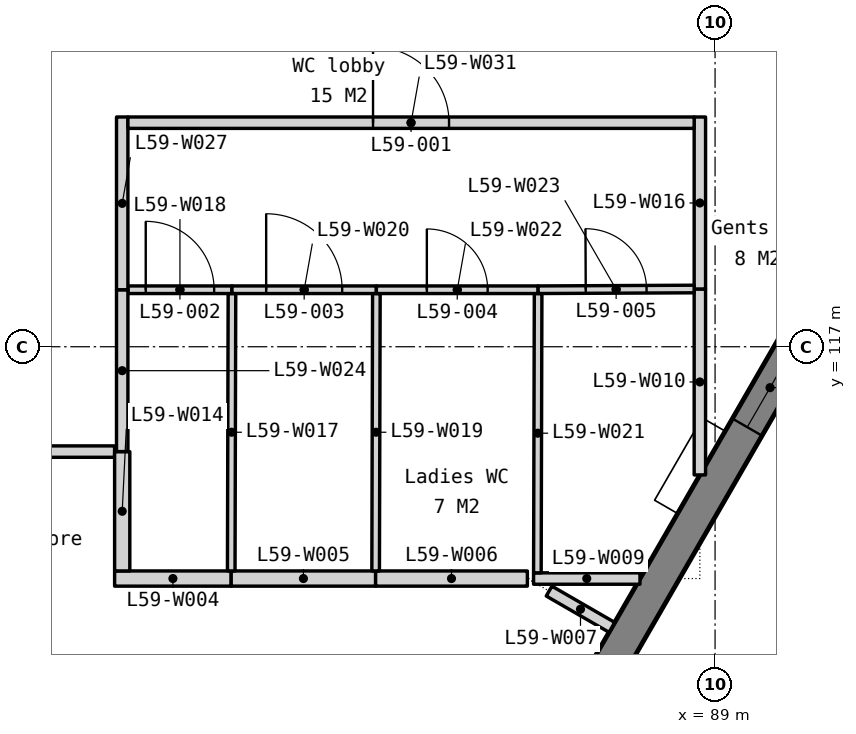
"""IFC4 building model, lengths in metres.
Left out: names, types, materials, properties, quantities, classifications, styles, units other than length and angle.
Written with IfcOpenShell. Run it as: python <this file> out.ifc"""

import sys

from ifc_helpers import new_model, si_unit, direction, frame, frame_2d, origin, place, context, subcontext, project, spatial, polyline, rectangle, outline, extrude, element, fill, save


model = new_model("IFC4")
c1 = context("Model", 3, precision=1e-05, world=origin(), true_north=direction((0.0, 1.0)))
c2 = subcontext(c1, "Body", "Model", "MODEL_VIEW")
j1 = project(units=[si_unit("LENGTHUNIT", "METRE"), si_unit("PLANEANGLEUNIT", "RADIAN")], contexts=[c1])
p1 = place(None, origin())
s1 = spatial("IfcSite", under=j1, at=p1, CompositionType="ELEMENT")
p2 = place(p1, origin())
s2 = spatial("IfcBuilding", under=s1, at=p2, CompositionType="ELEMENT")
p3 = place(p2, frame((0.0, 0.0, 242.6)))
s3 = spatial("IfcBuildingStorey", under=s2, at=p3, CompositionType="ELEMENT", Elevation=242.6)
p4 = place(p3, frame((80.905, 101.188, -0.15), z_axis=(0.0, 0.0, 1.0), x_axis=(0.500002536638, 0.866023939251, 0.0)))
e1 = element("IfcWall", 1, at=p4, inside=s3, PredefinedType="SOLIDWALL", context=c2, shape_type="SweptSolid", body=[
    extrude(outline(polyline([(36.972, 0.0), (36.972, 3.9), (0.0, 3.9), (0.0, 0.0), (36.972, 0.0)])), frame((0.0, 0.225, 0.0), z_axis=(0.0, -1.0, 0.0), x_axis=(1.0, 0.0, 0.0)), (0.0, 0.0, 1.0), 0.45),
])
p5 = place(p4, frame((0.715, 0.0, 0.95)))
e2 = element("IfcOpeningElement", 2, at=p5, cuts=e1, PredefinedType="OPENING", context=c2, shape_type="SweptSolid", body=[
    extrude(rectangle(XDim=1.2, YDim=2.2, at=frame_2d((0.6, 1.1))), frame((0.0, 0.235, 0.0), z_axis=(0.0, -1.0, 0.0), x_axis=(1.0, 0.0, 0.0)), (0.0, 0.0, 1.0), 0.47),
])
p6 = place(p4, frame((7.793, 0.0, 0.95)))
e3 = element("IfcOpeningElement", 3, at=p6, cuts=e1, PredefinedType="OPENING", context=c2, shape_type="SweptSolid", body=[
    extrude(rectangle(XDim=1.2, YDim=2.2, at=frame_2d((0.6, 1.1))), frame((0.0, 0.235, 0.0), z_axis=(0.0, -1.0, 0.0), x_axis=(1.0, 0.0, 0.0)), (0.0, 0.0, 1.0), 0.47),
])
p7 = place(p4, frame((9.493, 0.0, 0.95)))
e4 = element("IfcOpeningElement", 4, at=p7, cuts=e1, PredefinedType="OPENING", context=c2, shape_type="SweptSolid", body=[
    extrude(rectangle(XDim=1.2, YDim=2.2, at=frame_2d((0.6, 1.1))), frame((0.0, 0.235, 0.0), z_axis=(0.0, -1.0, 0.0), x_axis=(1.0, 0.0, 0.0)), (0.0, 0.0, 1.0), 0.47),
])
p8 = place(p4, frame((17.036, 0.0, 0.95)))
e5 = element("IfcOpeningElement", 5, at=p8, cuts=e1, PredefinedType="OPENING", context=c2, shape_type="SweptSolid", body=[
    extrude(rectangle(XDim=1.2, YDim=2.2, at=frame_2d((0.6, 1.1))), frame((0.0, 0.235, 0.0), z_axis=(0.0, -1.0, 0.0), x_axis=(1.0, 0.0, 0.0)), (0.0, 0.0, 1.0), 0.47),
])
p9 = place(p4, frame((18.736, 0.0, 0.95)))
e6 = element("IfcOpeningElement", 6, at=p9, cuts=e1, PredefinedType="OPENING", context=c2, shape_type="SweptSolid", body=[
    extrude(rectangle(XDim=1.2, YDim=2.2, at=frame_2d((0.6, 1.1))), frame((0.0, 0.235, 0.0), z_axis=(0.0, -1.0, 0.0), x_axis=(1.0, 0.0, 0.0)), (0.0, 0.0, 1.0), 0.47),
])
p10 = place(p4, frame((26.279, 0.0, 0.95)))
e7 = element("IfcOpeningElement", 7, at=p10, cuts=e1, PredefinedType="OPENING", context=c2, shape_type="SweptSolid", body=[
    extrude(rectangle(XDim=1.2, YDim=2.2, at=frame_2d((0.6, 1.1))), frame((0.0, 0.235, 0.0), z_axis=(0.0, -1.0, 0.0), x_axis=(1.0, 0.0, 0.0)), (0.0, 0.0, 1.0), 0.47),
])
p11 = place(p4, frame((27.979, 0.0, 0.95)))
e8 = element("IfcOpeningElement", 8, at=p11, cuts=e1, PredefinedType="OPENING", context=c2, shape_type="SweptSolid", body=[
    extrude(rectangle(XDim=1.2, YDim=2.2, at=frame_2d((0.6, 1.1))), frame((0.0, 0.235, 0.0), z_axis=(0.0, -1.0, 0.0), x_axis=(1.0, 0.0, 0.0)), (0.0, 0.0, 1.0), 0.47),
])
p12 = place(p4, frame((35.058, 0.0, 0.95)))
e9 = element("IfcOpeningElement", 9, at=p12, cuts=e1, PredefinedType="OPENING", context=c2, shape_type="SweptSolid", body=[
    extrude(rectangle(XDim=1.2, YDim=2.2, at=frame_2d((0.6, 1.1))), frame((0.0, 0.235, 0.0), z_axis=(0.0, -1.0, 0.0), x_axis=(1.0, 0.0, 0.0)), (0.0, 0.0, 1.0), 0.47),
])
p13 = place(p3, frame((81.1, 113.95, 0.0), z_axis=(0.0, 0.0, 1.0), x_axis=(1.0, 0.0, 0.0)))
e10 = element("IfcWall", 10, at=p13, inside=s3, PredefinedType="PARTITIONING", context=c2, shape_type="SweptSolid", body=[
    extrude(rectangle(XDim=1.534, YDim=0.2, at=frame_2d((0.767, 0.0))), origin(), (0.0, 0.0, 1.0), 3.75),
])
p14 = place(p3, frame((82.634, 113.95, 0.0), z_axis=(0.0, 0.0, 1.0), x_axis=(1.0, 0.0, 0.0)))
e11 = element("IfcWall", 11, at=p14, inside=s3, PredefinedType="PARTITIONING", context=c2, shape_type="SweptSolid", body=[
    extrude(rectangle(XDim=1.9, YDim=0.2, at=frame_2d((0.95, 0.0))), origin(), (0.0, 0.0, 1.0), 3.75),
])
p15 = place(p3, frame((84.534, 113.95, 0.0), z_axis=(0.0, 0.0, 1.0), x_axis=(1.0, 0.0, 0.0)))
e12 = element("IfcWall", 12, at=p15, inside=s3, PredefinedType="PARTITIONING", context=c2, shape_type="SweptSolid", body=[
    extrude(rectangle(XDim=1.997, YDim=0.2, at=frame_2d((0.998, 0.0))), origin(), (0.0, 0.0, 1.0), 3.75),
])
p16 = place(p3, frame((86.816, 113.785, 0.0), z_axis=(0.0, 0.0, 1.0), x_axis=(0.865951249342, -0.500128417272, 0.0)))
e13 = element("IfcWall", 13, at=p16, inside=s3, PredefinedType="PARTITIONING", context=c2, shape_type="SweptSolid", body=[
    extrude(rectangle(XDim=0.954, YDim=0.15, at=frame_2d((0.477, 0.0))), origin(), (0.0, 0.0, 1.0), 3.75),
])
p17 = place(p3, frame((86.612, 113.95, 0.0), z_axis=(0.0, 0.0, 1.0), x_axis=(1.0, 0.0, 0.0)))
e14 = element("IfcWall", 14, at=p17, inside=s3, PredefinedType="PARTITIONING", context=c2, shape_type="SweptSolid", body=[
    extrude(rectangle(XDim=1.4, YDim=0.15, at=frame_2d((0.7, 0.0))), origin(), (0.0, 0.0, 1.0), 3.75),
])
p18 = place(p3, frame((88.8, 115.313, 0.0), z_axis=(0.0, 0.0, 1.0), x_axis=(0.0, 1.0, 0.0)))
e15 = element("IfcWall", 15, at=p18, inside=s3, PredefinedType="PARTITIONING", context=c2, shape_type="SweptSolid", body=[
    extrude(rectangle(XDim=2.447, YDim=0.15, at=frame_2d((1.223, 0.0))), origin(), (0.0, 0.0, 1.0), 3.062),
])
p19 = place(p3, frame((76.363, 115.62, 0.0), z_axis=(0.0, 0.0, 1.0), x_axis=(1.0, 0.0, 0.0)))
e16 = element("IfcWall", 16, at=p19, inside=s3, PredefinedType="PARTITIONING", context=c2, shape_type="SweptSolid", body=[
    extrude(rectangle(XDim=4.737, YDim=0.15, at=frame_2d((2.369, 0.0))), origin(), (0.0, 0.0, 1.0), 3.75),
])
p20 = place(p19, frame((1.469, 0.0, 0.0)))
e17 = element("IfcOpeningElement", 17, at=p20, cuts=e16, PredefinedType="OPENING", context=c2, shape_type="SweptSolid", body=[
    extrude(rectangle(XDim=1.8, YDim=2.1, at=frame_2d((0.9, 1.05))), frame((0.0, 0.085, 0.0), z_axis=(0.0, -1.0, 0.0), x_axis=(1.0, 0.0, 0.0)), (0.0, 0.0, 1.0), 0.17),
])
p21 = place(p3, frame((81.2, 114.05, 0.0), z_axis=(0.0, 0.0, 1.0), x_axis=(0.0, 1.0, 0.0)))
e18 = element("IfcWall", 18, at=p21, inside=s3, PredefinedType="PARTITIONING", context=c2, shape_type="SweptSolid", body=[
    extrude(rectangle(XDim=1.57, YDim=0.2, at=frame_2d((0.785, 0.0))), origin(), (0.0, 0.0, 1.0), 3.75),
])
p22 = place(p3, frame((88.8, 117.76, 0.0), z_axis=(0.0, 0.0, 1.0), x_axis=(0.0, 1.0, 0.0)))
e19 = element("IfcWall", 19, at=p22, inside=s3, PredefinedType="PARTITIONING", context=c2, shape_type="SweptSolid", body=[
    extrude(rectangle(XDim=2.263, YDim=0.15, at=frame_2d((1.131, 0.0))), origin(), (0.0, 0.0, 1.0), 3.062),
])
p23 = place(p3, frame((82.634, 114.05, 0.0), z_axis=(0.0, 0.0, 1.0), x_axis=(0.002608686776, 0.999996597371, 0.0)))
e20 = element("IfcWall", 20, at=p23, inside=s3, PredefinedType="PARTITIONING", context=c2, shape_type="SweptSolid", body=[
    extrude(rectangle(XDim=3.65, YDim=0.1, at=frame_2d((1.825, 0.0))), origin(), (0.0, 0.0, 1.0), 3.75),
])
p24 = place(p3, frame((81.275, 117.75, 0.0), z_axis=(0.0, 0.0, 1.0), x_axis=(1.0, 0.0, 0.0)))
e21 = element("IfcWall", 21, at=p24, inside=s3, PredefinedType="PARTITIONING", context=c2, shape_type="SweptSolid", body=[
    extrude(rectangle(XDim=1.369, YDim=0.1, at=frame_2d((0.685, 0.0))), origin(), (0.0, 0.0, 1.0), 3.75),
])
p25 = place(p24, frame((0.235, 0.0, 0.0)))
e22 = element("IfcOpeningElement", 22, at=p25, cuts=e21, PredefinedType="OPENING", context=c2, shape_type="SweptSolid", body=[
    extrude(rectangle(XDim=0.9, YDim=2.1, at=frame_2d((0.45, 1.05))), frame((0.0, 0.06, 0.0), z_axis=(0.0, -1.0, 0.0), x_axis=(1.0, 0.0, 0.0)), (0.0, 0.0, 1.0), 0.12),
])
p26 = place(p3, frame((84.534, 114.05, 0.0), z_axis=(0.0, 0.0, 1.0), x_axis=(0.002675575707, 0.999996420641, 0.0)))
e23 = element("IfcWall", 23, at=p26, inside=s3, PredefinedType="PARTITIONING", context=c2, shape_type="SweptSolid", body=[
    extrude(rectangle(XDim=3.65, YDim=0.1, at=frame_2d((1.825, 0.0))), origin(), (0.0, 0.0, 1.0), 3.75),
])
p27 = place(p3, frame((82.644, 117.75, 0.0), z_axis=(0.0, 0.0, 1.0), x_axis=(1.0, 0.0, 0.0)))
e24 = element("IfcWall", 24, at=p27, inside=s3, PredefinedType="PARTITIONING", context=c2, shape_type="SweptSolid", body=[
    extrude(rectangle(XDim=1.9, YDim=0.1, at=frame_2d((0.95, 0.0))), origin(), (0.0, 0.0, 1.0), 3.75),
])
p28 = place(p27, frame((0.45, 0.0, 0.0)))
e25 = element("IfcOpeningElement", 25, at=p28, cuts=e24, PredefinedType="OPENING", context=c2, shape_type="SweptSolid", body=[
    extrude(rectangle(XDim=1.0, YDim=2.1, at=frame_2d((0.5, 1.05))), frame((0.0, 0.06, 0.0), z_axis=(0.0, -1.0, 0.0), x_axis=(1.0, 0.0, 0.0)), (0.0, 0.0, 1.0), 0.12),
])
p29 = place(p3, frame((86.662, 114.025, 0.0), z_axis=(0.0, 0.0, 1.0), x_axis=(0.002657268237, 0.999996469457, 0.0)))
e26 = element("IfcWall", 26, at=p29, inside=s3, PredefinedType="PARTITIONING", context=c2, shape_type="SweptSolid", body=[
    extrude(rectangle(XDim=3.675, YDim=0.1, at=frame_2d((1.837, 0.0))), origin(), (0.0, 0.0, 1.0), 3.75),
])
p30 = place(p3, frame((84.544, 117.75, 0.0), z_axis=(0.0, 0.0, 1.0), x_axis=(1.0, 0.0, 0.0)))
e27 = element("IfcWall", 27, at=p30, inside=s3, PredefinedType="PARTITIONING", context=c2, shape_type="SweptSolid", body=[
    extrude(rectangle(XDim=2.128, YDim=0.1, at=frame_2d((1.064, 0.0))), origin(), (0.0, 0.0, 1.0), 3.75),
])
p31 = place(p30, frame((0.664, 0.0, 0.0)))
e28 = element("IfcOpeningElement", 28, at=p31, cuts=e27, PredefinedType="OPENING", context=c2, shape_type="SweptSolid", body=[
    extrude(rectangle(XDim=0.8, YDim=2.1, at=frame_2d((0.4, 1.05))), frame((0.0, 0.06, 0.0), z_axis=(0.0, -1.0, 0.0), x_axis=(1.0, 0.0, 0.0)), (0.0, 0.0, 1.0), 0.12),
])
p32 = place(p3, frame((86.672, 117.75, 0.0), z_axis=(0.0, 0.0, 1.0), x_axis=(0.99998868658, 0.004756754366, 0.0)))
e29 = element("IfcWall", 29, at=p32, inside=s3, PredefinedType="PARTITIONING", context=c2, shape_type="SweptSolid", body=[
    extrude(rectangle(XDim=2.053, YDim=0.1, at=frame_2d((1.026, 0.0))), origin(), (0.0, 0.0, 1.0), 3.75),
])
p33 = place(p32, frame((0.626, 0.0, 0.0)))
e30 = element("IfcOpeningElement", 30, at=p33, cuts=e29, PredefinedType="OPENING", context=c2, shape_type="SweptSolid", body=[
    extrude(rectangle(XDim=0.8, YDim=2.1, at=frame_2d((0.4, 1.05))), frame((0.0, 0.06, 0.0), z_axis=(0.0, -1.0, 0.0), x_axis=(1.0, 0.0, 0.0)), (0.0, 0.0, 1.0), 0.12),
])
p34 = place(p3, frame((81.2, 115.62, 0.0), z_axis=(0.0, 0.0, 1.0), x_axis=(0.0, 1.0, 0.0)))
e31 = element("IfcWall", 31, at=p34, inside=s3, PredefinedType="PARTITIONING", context=c2, shape_type="SweptSolid", body=[
    extrude(rectangle(XDim=2.13, YDim=0.15, at=frame_2d((1.065, 0.0))), origin(), (0.0, 0.0, 1.0), 3.75),
])
p35 = place(p3, frame((81.2, 117.75, 0.0), z_axis=(0.0, 0.0, 1.0), x_axis=(0.0, 1.0, 0.0)))
e32 = element("IfcWall", 32, at=p35, inside=s3, PredefinedType="PARTITIONING", context=c2, shape_type="SweptSolid", body=[
    extrude(rectangle(XDim=2.273, YDim=0.15, at=frame_2d((1.136, 0.0))), origin(), (0.0, 0.0, 1.0), 3.75),
])
p36 = place(p3, frame((81.275, 119.948, 0.0), z_axis=(0.0, 0.0, 1.0), x_axis=(1.0, 0.0, 0.0)))
e33 = element("IfcWall", 33, at=p36, inside=s3, PredefinedType="PARTITIONING", context=c2, shape_type="SweptSolid", body=[
    extrude(rectangle(XDim=7.45, YDim=0.15, at=frame_2d((3.725, 0.0))), origin(), (0.0, 0.0, 1.0), 3.75),
])
p37 = place(p36, frame((3.225, 0.0, 0.0)))
e34 = element("IfcOpeningElement", 34, at=p37, cuts=e33, PredefinedType="OPENING", context=c2, shape_type="SweptSolid", body=[
    extrude(rectangle(XDim=1.0, YDim=2.1, at=frame_2d((0.5, 1.05))), frame((0.0, 0.085, 0.0), z_axis=(0.0, -1.0, 0.0), x_axis=(1.0, 0.0, 0.0)), (0.0, 0.0, 1.0), 0.17),
])
p38 = place(p8, origin())
e35 = element("IfcWindow", 35, at=p38, inside=s3, PartitioningType="SINGLE_PANEL", PredefinedType="WINDOW", context=c2, shape_type="SweptSolid", body=[
    extrude(rectangle(XDim=1.2, YDim=2.2, at=frame_2d((0.6, 1.1))), frame((0.0, 0.03, 0.0), z_axis=(0.0, -1.0, 0.0), x_axis=(1.0, 0.0, 0.0)), (0.0, 0.0, 1.0), 0.06),
])
fill(e5, e35)
p39 = place(p37, origin())
e36 = element("IfcDoor", 36, at=p39, inside=s3, OperationType="SINGLE_SWING_LEFT", PredefinedType="DOOR", context=c2, shape_type="SweptSolid", body=[
    extrude(rectangle(XDim=1.0, YDim=2.1, at=frame_2d((0.5, 1.05))), frame((0.0, 0.025, 0.0), z_axis=(0.0, -1.0, 0.0), x_axis=(1.0, 0.0, 0.0)), (0.0, 0.0, 1.0), 0.05),
])
fill(e34, e36)
p40 = place(p25, origin())
e37 = element("IfcDoor", 37, at=p40, inside=s3, OperationType="SINGLE_SWING_LEFT", PredefinedType="DOOR", context=c2, shape_type="SweptSolid", body=[
    extrude(rectangle(XDim=0.9, YDim=2.1, at=frame_2d((0.45, 1.05))), frame((0.0, 0.025, 0.0), z_axis=(0.0, -1.0, 0.0), x_axis=(1.0, 0.0, 0.0)), (0.0, 0.0, 1.0), 0.05),
])
fill(e22, e37)
p41 = place(p28, origin())
e38 = element("IfcDoor", 38, at=p41, inside=s3, OperationType="SINGLE_SWING_LEFT", PredefinedType="DOOR", context=c2, shape_type="SweptSolid", body=[
    extrude(rectangle(XDim=1.0, YDim=2.1, at=frame_2d((0.5, 1.05))), frame((0.0, 0.025, 0.0), z_axis=(0.0, -1.0, 0.0), x_axis=(1.0, 0.0, 0.0)), (0.0, 0.0, 1.0), 0.05),
])
fill(e25, e38)
p42 = place(p31, origin())
e39 = element("IfcDoor", 39, at=p42, inside=s3, OperationType="SINGLE_SWING_LEFT", PredefinedType="DOOR", context=c2, shape_type="SweptSolid", body=[
    extrude(rectangle(XDim=0.8, YDim=2.1, at=frame_2d((0.4, 1.05))), frame((0.0, 0.025, 0.0), z_axis=(0.0, -1.0, 0.0), x_axis=(1.0, 0.0, 0.0)), (0.0, 0.0, 1.0), 0.05),
])
fill(e28, e39)
p43 = place(p33, origin())
e40 = element("IfcDoor", 40, at=p43, inside=s3, OperationType="SINGLE_SWING_LEFT", PredefinedType="DOOR", context=c2, shape_type="SweptSolid", body=[
    extrude(rectangle(XDim=0.8, YDim=2.1, at=frame_2d((0.4, 1.05))), frame((0.0, 0.025, 0.0), z_axis=(0.0, -1.0, 0.0), x_axis=(1.0, 0.0, 0.0)), (0.0, 0.0, 1.0), 0.05),
])
fill(e30, e40)
save(model, sys.argv[1])
